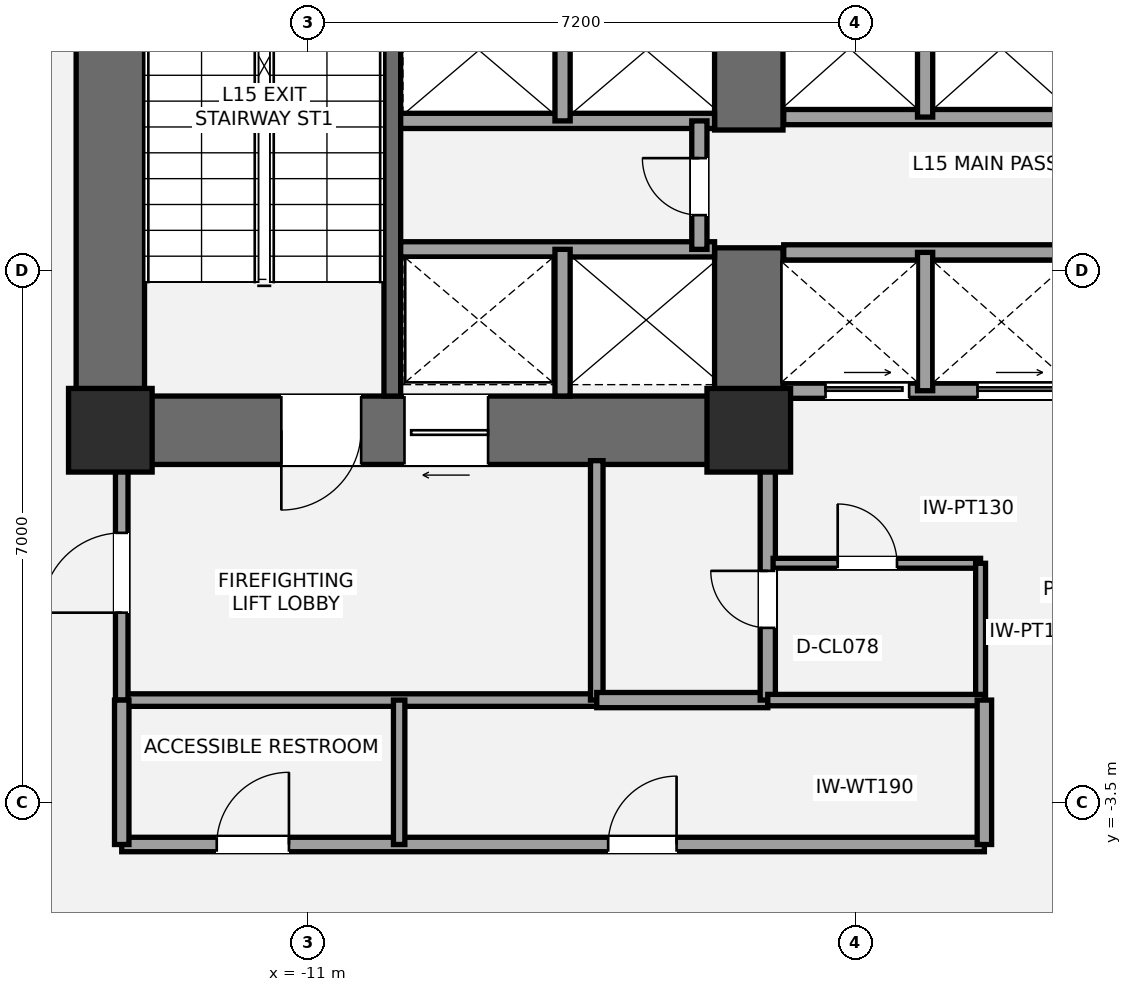
"""IFC4 building model, lengths in metres.
Left out: names, types, materials, properties, quantities, classifications, styles, units other than length and angle.
Written with IfcOpenShell. Run it as: python <this file> out.ifc"""

import sys

from ifc_helpers import new_model, si_unit, direction, frame, frame_2d, origin, origin_2d, place, context, subcontext, project, spatial, rectangle, extrude, element, fill, save


model = new_model("IFC4")
c1 = context("Model", 3, precision=1e-05, world=origin(), true_north=direction((0.0, 1.0)))
c2 = subcontext(c1, "Body", "Model", "MODEL_VIEW")
j1 = project(units=[si_unit("LENGTHUNIT", "METRE"), si_unit("PLANEANGLEUNIT", "RADIAN")], contexts=[c1])
p1 = place(None, origin())
s1 = spatial("IfcSite", under=j1, at=p1, CompositionType="ELEMENT")
p2 = place(p1, origin())
s2 = spatial("IfcBuilding", under=s1, at=p2, CompositionType="ELEMENT")
p3 = place(p2, frame((0.0, 0.0, 59.4)))
s3 = spatial("IfcBuildingStorey", under=s2, at=p3, CompositionType="ELEMENT", Elevation=59.4)
p4 = place(p3, frame((-13.6, 0.95, 0.0), z_axis=(0.0, 0.0, 1.0), x_axis=(0.0, 1.0, 0.0)))
e1 = element("IfcWall", 1, at=p4, inside=s3, PredefinedType="SHEAR", context=c2, shape_type="SweptSolid", body=[
    extrude(rectangle(XDim=8.95, YDim=0.9, at=frame_2d((4.475, 0.0))), origin(), (0.0, 0.0, 1.0), 3.6),
])
p5 = place(p3, frame((-4.75, 1.4, 0.0), z_axis=(0.0, 0.0, 1.0), x_axis=(-1.0, 0.0, 0.0)))
e2 = element("IfcWall", 2, at=p5, inside=s3, PredefinedType="SHEAR", context=c2, shape_type="SweptSolid", body=[
    extrude(rectangle(XDim=9.3, YDim=0.9, at=frame_2d((4.65, 0.0))), origin(), (0.0, 0.0, 1.0), 3.6),
])
p6 = place(p5, frame((5.55, 0.0, 0.0)))
e3 = element("IfcOpeningElement", 3, at=p6, cuts=e2, PredefinedType="OPENING", context=c2, shape_type="SweptSolid", body=[
    extrude(rectangle(XDim=1.05, YDim=2.15, at=frame_2d((0.525, 1.075))), frame((0.0, 0.46, 0.0), z_axis=(0.0, -1.0, 0.0), x_axis=(1.0, 0.0, 0.0)), (0.0, 0.0, 1.0), 0.92),
])
p7 = place(p5, frame((3.88, 0.0, 0.0)))
e4 = element("IfcOpeningElement", 4, at=p7, cuts=e2, PredefinedType="OPENING", context=c2, shape_type="SweptSolid", body=[
    extrude(rectangle(XDim=1.1, YDim=2.2, at=frame_2d((0.55, 1.1))), frame((0.0, 0.46, 0.0), z_axis=(0.0, -1.0, 0.0), x_axis=(1.0, 0.0, 0.0)), (0.0, 0.0, 1.0), 0.92),
])
p8 = place(p3, frame((-5.2, 0.95, 0.0), z_axis=(0.0, 0.0, 1.0), x_axis=(0.0, 1.0, 0.0)))
e5 = element("IfcWall", 5, at=p8, inside=s3, PredefinedType="SHEAR", context=c2, shape_type="SweptSolid", body=[
    extrude(rectangle(XDim=2.85, YDim=0.9, at=frame_2d((1.425, 0.0))), origin(), (0.0, 0.0, 1.0), 3.6),
])
p9 = place(p3, frame((-5.2, 5.35, 0.0), z_axis=(0.0, 0.0, 1.0), x_axis=(0.0, 1.0, 0.0)))
e6 = element("IfcWall", 6, at=p9, inside=s3, PredefinedType="SHEAR", context=c2, shape_type="SweptSolid", body=[
    extrude(rectangle(XDim=2.0, YDim=0.9, at=frame_2d((1.0, 0.0))), origin(), (0.0, 0.0, 1.0), 3.6),
])
p10 = place(p3, frame((-9.89, 1.85, 0.0), z_axis=(0.0, 0.0, 1.0), x_axis=(0.0, 1.0, 0.0)))
e7 = element("IfcWall", 7, at=p10, inside=s3, PredefinedType="SHEAR", context=c2, shape_type="SweptSolid", body=[
    extrude(rectangle(XDim=7.15, YDim=0.22, at=frame_2d((3.575, 0.0))), origin(), (0.0, 0.0, 1.0), 3.6),
])
for number, where, z_axis, x_axis in (
    (8, (-13.6, 1.4, 0.0), (0.0, 0.0, 1.0), (1.0, 0.0, 0.0)),
    (9, (-5.2, 1.4, 0.0), (0.0, 0.0, 1.0), (1.0, 0.0, 0.0)),
):
    element("IfcColumn", number, at=place(p3, frame(where, z_axis=z_axis, x_axis=x_axis)), inside=s3, PredefinedType="COLUMN", context=c2, shape_type="SweptSolid", body=[
        extrude(rectangle(XDim=1.1, YDim=1.1, at=origin_2d()), origin(), (0.0, 0.0, 1.0), 3.6),
    ])
p11 = place(p3, frame((-13.45, -2.15, 0.0), z_axis=(0.0, 0.0, 1.0), x_axis=(1.0, 0.0, 0.0)))
e10 = element("IfcWall", 10, at=p11, inside=s3, PredefinedType="PARTITIONING", context=c2, shape_type="SweptSolid", body=[
    extrude(rectangle(XDim=6.25, YDim=0.165, at=frame_2d((3.125, 0.0))), origin(), (0.0, 0.0, 1.0), 2.853),
])
p12 = place(p3, frame((-13.45, -2.15, 0.0), z_axis=(0.0, 0.0, 1.0), x_axis=(0.0, 1.0, 0.0)))
e11 = element("IfcWall", 11, at=p12, inside=s3, PredefinedType="PARTITIONING", context=c2, shape_type="SweptSolid", body=[
    extrude(rectangle(XDim=3.15, YDim=0.165, at=frame_2d((1.575, 0.0))), origin(), (0.0, 0.0, 1.0), 2.853),
])
p13 = place(p12, frame((1.15, 0.0, 0.0)))
e12 = element("IfcOpeningElement", 12, at=p13, cuts=e11, PredefinedType="OPENING", context=c2, shape_type="SweptSolid", body=[
    extrude(rectangle(XDim=1.05, YDim=2.15, at=frame_2d((0.525, 1.075))), frame((0.0, 0.093, 0.0), z_axis=(0.0, -1.0, 0.0), x_axis=(1.0, 0.0, 0.0)), (0.0, 0.0, 1.0), 0.185),
])
p14 = place(p3, frame((-7.2, -2.15, 0.0), z_axis=(0.0, 0.0, 1.0), x_axis=(0.0, 1.0, 0.0)))
e13 = element("IfcWall", 13, at=p14, inside=s3, PredefinedType="PARTITIONING", context=c2, shape_type="SweptSolid", body=[
    extrude(rectangle(XDim=3.15, YDim=0.165, at=frame_2d((1.575, 0.0))), origin(), (0.0, 0.0, 1.0), 2.853),
])
p15 = place(p3, frame((-7.2, -2.15, 0.0), z_axis=(0.0, 0.0, 1.0), x_axis=(1.0, 0.0, 0.0)))
e14 = element("IfcWall", 14, at=p15, inside=s3, PredefinedType="SOLIDWALL", context=c2, shape_type="SweptSolid", body=[
    extrude(rectangle(XDim=2.25, YDim=0.2, at=frame_2d((1.125, 0.0))), origin(), (0.0, 0.0, 1.0), 3.4),
])
p16 = place(p3, frame((-4.95, -2.15, 0.0), z_axis=(0.0, 0.0, 1.0), x_axis=(0.0, 1.0, 0.0)))
e15 = element("IfcWall", 15, at=p16, inside=s3, PredefinedType="SOLIDWALL", context=c2, shape_type="SweptSolid", body=[
    extrude(rectangle(XDim=3.15, YDim=0.2, at=frame_2d((1.575, 0.0))), origin(), (0.0, 0.0, 1.0), 2.853),
])
p17 = place(p16, frame((0.95, 0.0, 0.0)))
e16 = element("IfcOpeningElement", 16, at=p17, cuts=e15, PredefinedType="OPENING", context=c2, shape_type="SweptSolid", body=[
    extrude(rectangle(XDim=0.75, YDim=2.1, at=frame_2d((0.375, 1.05))), frame((0.0, 0.11, 0.0), z_axis=(0.0, -1.0, 0.0), x_axis=(1.0, 0.0, 0.0)), (0.0, 0.0, 1.0), 0.22),
])
p18 = place(p3, frame((-4.88, -0.35, 0.0), z_axis=(0.0, 0.0, 1.0), x_axis=(1.0, 0.0, 0.0)))
e17 = element("IfcWall", 17, at=p18, inside=s3, PredefinedType="PARTITIONING", context=c2, shape_type="SweptSolid", body=[
    extrude(rectangle(XDim=2.73, YDim=0.13, at=frame_2d((1.365, 0.0))), origin(), (0.0, 0.0, 1.0), 3.4),
])
p19 = place(p18, frame((0.85, 0.0, 0.0)))
e18 = element("IfcOpeningElement", 18, at=p19, cuts=e17, PredefinedType="OPENING", context=c2, shape_type="SweptSolid", body=[
    extrude(rectangle(XDim=0.78, YDim=2.1, at=frame_2d((0.39, 1.05))), frame((0.0, 0.075, 0.0), z_axis=(0.0, -1.0, 0.0), x_axis=(1.0, 0.0, 0.0)), (0.0, 0.0, 1.0), 0.15),
])
p20 = place(p3, frame((-2.15, -2.15, 0.0), z_axis=(0.0, 0.0, 1.0), x_axis=(0.0, 1.0, 0.0)))
e19 = element("IfcWall", 19, at=p20, inside=s3, PredefinedType="PARTITIONING", context=c2, shape_type="SweptSolid", body=[
    extrude(rectangle(XDim=1.8, YDim=0.13, at=frame_2d((0.9, 0.0))), origin(), (0.0, 0.0, 1.0), 3.4),
])
p21 = place(p3, frame((-9.78, 3.78, 0.0), z_axis=(0.0, 0.0, 1.0), x_axis=(1.0, 0.0, 0.0)))
e20 = element("IfcWall", 20, at=p21, inside=s3, PredefinedType="SOLIDWALL", context=c2, shape_type="SweptSolid", body=[
    extrude(rectangle(XDim=4.13, YDim=0.2, at=frame_2d((2.065, 0.0))), origin(), (0.0, 0.0, 1.0), 3.4),
])
p22 = place(p3, frame((-7.65, 1.85, 0.0), z_axis=(0.0, 0.0, 1.0), x_axis=(0.0, 1.0, 0.0)))
e21 = element("IfcWall", 21, at=p22, inside=s3, PredefinedType="SOLIDWALL", context=c2, shape_type="SweptSolid", body=[
    extrude(rectangle(XDim=1.93, YDim=0.2, at=frame_2d((0.965, 0.0))), origin(), (0.0, 0.0, 1.0), 3.4),
])
p23 = place(p3, frame((-9.78, 5.47, 0.0), z_axis=(0.0, 0.0, 1.0), x_axis=(1.0, 0.0, 0.0)))
e22 = element("IfcWall", 22, at=p23, inside=s3, PredefinedType="SOLIDWALL", context=c2, shape_type="SweptSolid", body=[
    extrude(rectangle(XDim=4.13, YDim=0.2, at=frame_2d((2.065, 0.0))), origin(), (0.0, 0.0, 1.0), 3.4),
])
p24 = place(p3, frame((-7.65, 5.47, 0.0), z_axis=(0.0, 0.0, 1.0), x_axis=(0.0, 1.0, 0.0)))
e23 = element("IfcWall", 23, at=p24, inside=s3, PredefinedType="SOLIDWALL", context=c2, shape_type="SweptSolid", body=[
    extrude(rectangle(XDim=1.86, YDim=0.2, at=frame_2d((0.93, 0.0))), origin(), (0.0, 0.0, 1.0), 3.4),
])
p25 = place(p3, frame((-5.85, 3.78, 0.0), z_axis=(0.0, 0.0, 1.0), x_axis=(0.0, 1.0, 0.0)))
e24 = element("IfcWall", 24, at=p25, inside=s3, PredefinedType="SOLIDWALL", context=c2, shape_type="SweptSolid", body=[
    extrude(rectangle(XDim=1.69, YDim=0.2, at=frame_2d((0.845, 0.0))), origin(), (0.0, 0.0, 1.0), 3.4),
])
p26 = place(p25, frame((0.45, 0.0, 0.0)))
e25 = element("IfcOpeningElement", 25, at=p26, cuts=e24, PredefinedType="OPENING", context=c2, shape_type="SweptSolid", body=[
    extrude(rectangle(XDim=0.75, YDim=2.1, at=frame_2d((0.375, 1.05))), frame((0.0, 0.11, 0.0), z_axis=(0.0, -1.0, 0.0), x_axis=(1.0, 0.0, 0.0)), (0.0, 0.0, 1.0), 0.22),
])
p27 = place(p3, frame((-4.74, 1.92, 0.0), z_axis=(0.0, 0.0, 1.0), x_axis=(1.0, 0.0, 0.0)))
e26 = element("IfcWall", 26, at=p27, inside=s3, PredefinedType="SOLIDWALL", context=c2, shape_type="SweptSolid", body=[
    extrude(rectangle(XDim=3.86, YDim=0.2, at=frame_2d((1.93, 0.0))), origin(), (0.0, 0.0, 1.0), 2.39),
])
p28 = place(p27, frame((0.55, 0.0, 0.0)))
e27 = element("IfcOpeningElement", 27, at=p28, cuts=e26, PredefinedType="OPENING", context=c2, shape_type="SweptSolid", body=[
    extrude(rectangle(XDim=1.1, YDim=2.2, at=frame_2d((0.55, 1.1))), frame((0.0, 0.11, 0.0), z_axis=(0.0, -1.0, 0.0), x_axis=(1.0, 0.0, 0.0)), (0.0, 0.0, 1.0), 0.22),
])
p29 = place(p27, frame((2.55, 0.0, 0.0)))
e28 = element("IfcOpeningElement", 28, at=p29, cuts=e26, PredefinedType="OPENING", context=c2, shape_type="SweptSolid", body=[
    extrude(rectangle(XDim=1.1, YDim=2.2, at=frame_2d((0.55, 1.1))), frame((0.0, 0.11, 0.0), z_axis=(0.0, -1.0, 0.0), x_axis=(1.0, 0.0, 0.0)), (0.0, 0.0, 1.0), 0.22),
])
p30 = place(p3, frame((-4.74, 3.74, 0.0), z_axis=(0.0, 0.0, 1.0), x_axis=(1.0, 0.0, 0.0)))
e29 = element("IfcWall", 29, at=p30, inside=s3, PredefinedType="SOLIDWALL", context=c2, shape_type="SweptSolid", body=[
    extrude(rectangle(XDim=3.86, YDim=0.2, at=frame_2d((1.93, 0.0))), origin(), (0.0, 0.0, 1.0), 3.4),
])
p31 = place(p3, frame((-2.88, 1.92, 0.0), z_axis=(0.0, 0.0, 1.0), x_axis=(0.0, 1.0, 0.0)))
e30 = element("IfcWall", 30, at=p31, inside=s3, PredefinedType="SOLIDWALL", context=c2, shape_type="SweptSolid", body=[
    extrude(rectangle(XDim=1.82, YDim=0.2, at=frame_2d((0.91, 0.0))), origin(), (0.0, 0.0, 1.0), 3.4),
])
p32 = place(p3, frame((-4.74, 5.52, 0.0), z_axis=(0.0, 0.0, 1.0), x_axis=(1.0, 0.0, 0.0)))
e31 = element("IfcWall", 31, at=p32, inside=s3, PredefinedType="SOLIDWALL", context=c2, shape_type="SweptSolid", body=[
    extrude(rectangle(XDim=3.86, YDim=0.2, at=frame_2d((1.93, 0.0))), origin(), (0.0, 0.0, 1.0), 3.4),
])
p33 = place(p3, frame((-2.88, 5.52, 0.0), z_axis=(0.0, 0.0, 1.0), x_axis=(0.0, 1.0, 0.0)))
e32 = element("IfcWall", 32, at=p33, inside=s3, PredefinedType="SOLIDWALL", context=c2, shape_type="SweptSolid", body=[
    extrude(rectangle(XDim=1.81, YDim=0.2, at=frame_2d((0.905, 0.0))), origin(), (0.0, 0.0, 1.0), 3.4),
])
p34 = place(p3, frame((-13.45, -4.05, 0.0), z_axis=(0.0, 0.0, 1.0), x_axis=(1.0, 0.0, 0.0)))
e33 = element("IfcWall", 33, at=p34, inside=s3, PredefinedType="PLUMBINGWALL", context=c2, shape_type="SweptSolid", body=[
    extrude(rectangle(XDim=11.35, YDim=0.19, at=frame_2d((5.675, 0.0))), origin(), (0.0, 0.0, 1.0), 2.933),
])
p35 = place(p34, frame((1.25, 0.0, 0.0)))
e34 = element("IfcOpeningElement", 34, at=p35, cuts=e33, PredefinedType="OPENING", context=c2, shape_type="SweptSolid", body=[
    extrude(rectangle(XDim=0.95, YDim=2.15, at=frame_2d((0.475, 1.075))), frame((0.0, 0.105, 0.0), z_axis=(0.0, -1.0, 0.0), x_axis=(1.0, 0.0, 0.0)), (0.0, 0.0, 1.0), 0.21),
])
p36 = place(p34, frame((6.4, 0.0, 0.0)))
e35 = element("IfcOpeningElement", 35, at=p36, cuts=e33, PredefinedType="OPENING", context=c2, shape_type="SweptSolid", body=[
    extrude(rectangle(XDim=0.9, YDim=2.1, at=frame_2d((0.45, 1.05))), frame((0.0, 0.105, 0.0), z_axis=(0.0, -1.0, 0.0), x_axis=(1.0, 0.0, 0.0)), (0.0, 0.0, 1.0), 0.21),
])
p37 = place(p3, frame((-4.95, -2.15, 0.0), z_axis=(0.0, 0.0, 1.0), x_axis=(1.0, 0.0, 0.0)))
e36 = element("IfcWall", 36, at=p37, inside=s3, PredefinedType="PLUMBINGWALL", context=c2, shape_type="SweptSolid", body=[
    extrude(rectangle(XDim=2.85, YDim=0.15, at=frame_2d((1.425, 0.0))), origin(), (0.0, 0.0, 1.0), 3.4),
])
p38 = place(p3, frame((-13.45, -4.05, 0.0), z_axis=(0.0, 0.0, 1.0), x_axis=(0.0, 1.0, 0.0)))
e37 = element("IfcWall", 37, at=p38, inside=s3, PredefinedType="PLUMBINGWALL", context=c2, shape_type="SweptSolid", body=[
    extrude(rectangle(XDim=1.9, YDim=0.19, at=frame_2d((0.95, 0.0))), origin(), (0.0, 0.0, 1.0), 2.853),
])
p39 = place(p3, frame((-2.1, -4.05, 0.0), z_axis=(0.0, 0.0, 1.0), x_axis=(0.0, 1.0, 0.0)))
e38 = element("IfcWall", 38, at=p39, inside=s3, PredefinedType="PLUMBINGWALL", context=c2, shape_type="SweptSolid", body=[
    extrude(rectangle(XDim=1.9, YDim=0.19, at=frame_2d((0.95, 0.0))), origin(), (0.0, 0.0, 1.0), 3.4),
])
p40 = place(p3, frame((-9.8, -4.05, 0.0), z_axis=(0.0, 0.0, 1.0), x_axis=(0.0, 1.0, 0.0)))
e39 = element("IfcWall", 39, at=p40, inside=s3, PredefinedType="PLUMBINGWALL", context=c2, shape_type="SweptSolid", body=[
    extrude(rectangle(XDim=1.9, YDim=0.15, at=frame_2d((0.95, 0.0))), origin(), (0.0, 0.0, 1.0), 3.4),
])
p41 = place(p6, origin())
e40 = element("IfcDoor", 40, at=p41, inside=s3, OperationType="SINGLE_SWING_RIGHT", PredefinedType="DOOR", context=c2, shape_type="SweptSolid", body=[
    extrude(rectangle(XDim=1.05, YDim=2.15, at=frame_2d((0.525, 1.075))), frame((0.0, 0.025, 0.0), z_axis=(0.0, -1.0, 0.0), x_axis=(1.0, 0.0, 0.0)), (0.0, 0.0, 1.0), 0.05),
])
fill(e3, e40)
p42 = place(p13, origin())
e41 = element("IfcDoor", 41, at=p42, inside=s3, OperationType="SINGLE_SWING_LEFT", PredefinedType="DOOR", context=c2, shape_type="SweptSolid", body=[
    extrude(rectangle(XDim=1.05, YDim=2.15, at=frame_2d((0.525, 1.075))), frame((0.0, 0.025, 0.0), z_axis=(0.0, -1.0, 0.0), x_axis=(1.0, 0.0, 0.0)), (0.0, 0.0, 1.0), 0.05),
])
fill(e12, e41)
p43 = place(p17, origin())
e42 = element("IfcDoor", 42, at=p43, inside=s3, OperationType="SINGLE_SWING_RIGHT", PredefinedType="DOOR", context=c2, shape_type="SweptSolid", body=[
    extrude(rectangle(XDim=0.75, YDim=2.1, at=frame_2d((0.375, 1.05))), frame((0.0, 0.025, 0.0), z_axis=(0.0, -1.0, 0.0), x_axis=(1.0, 0.0, 0.0)), (0.0, 0.0, 1.0), 0.05),
])
fill(e16, e42)
p44 = place(p19, origin())
e43 = element("IfcDoor", 43, at=p44, inside=s3, OperationType="SINGLE_SWING_LEFT", PredefinedType="DOOR", context=c2, shape_type="SweptSolid", body=[
    extrude(rectangle(XDim=0.78, YDim=2.1, at=frame_2d((0.39, 1.05))), frame((0.0, 0.025, 0.0), z_axis=(0.0, -1.0, 0.0), x_axis=(1.0, 0.0, 0.0)), (0.0, 0.0, 1.0), 0.05),
])
fill(e18, e43)
p45 = place(p7, origin())
e44 = element("IfcDoor", 44, at=p45, inside=s3, OperationType="SLIDING_TO_LEFT", PredefinedType="DOOR", context=c2, shape_type="SweptSolid", body=[
    extrude(rectangle(XDim=1.1, YDim=2.2, at=frame_2d((0.55, 1.1))), frame((0.0, 0.025, 0.0), z_axis=(0.0, -1.0, 0.0), x_axis=(1.0, 0.0, 0.0)), (0.0, 0.0, 1.0), 0.05),
])
fill(e4, e44)
p46 = place(p26, origin())
e45 = element("IfcDoor", 45, at=p46, inside=s3, OperationType="SINGLE_SWING_RIGHT", PredefinedType="DOOR", context=c2, shape_type="SweptSolid", body=[
    extrude(rectangle(XDim=0.75, YDim=2.1, at=frame_2d((0.375, 1.05))), frame((0.0, 0.025, 0.0), z_axis=(0.0, -1.0, 0.0), x_axis=(1.0, 0.0, 0.0)), (0.0, 0.0, 1.0), 0.05),
])
fill(e25, e45)
p47 = place(p28, origin())
e46 = element("IfcDoor", 46, at=p47, inside=s3, OperationType="SLIDING_TO_LEFT", PredefinedType="DOOR", context=c2, shape_type="SweptSolid", body=[
    extrude(rectangle(XDim=1.1, YDim=2.2, at=frame_2d((0.55, 1.1))), frame((0.0, 0.025, 0.0), z_axis=(0.0, -1.0, 0.0), x_axis=(1.0, 0.0, 0.0)), (0.0, 0.0, 1.0), 0.05),
])
fill(e27, e46)
p48 = place(p29, origin())
e47 = element("IfcDoor", 47, at=p48, inside=s3, OperationType="SLIDING_TO_LEFT", PredefinedType="DOOR", context=c2, shape_type="SweptSolid", body=[
    extrude(rectangle(XDim=1.1, YDim=2.2, at=frame_2d((0.55, 1.1))), frame((0.0, 0.025, 0.0), z_axis=(0.0, -1.0, 0.0), x_axis=(1.0, 0.0, 0.0)), (0.0, 0.0, 1.0), 0.05),
])
fill(e28, e47)
p49 = place(p35, origin())
e48 = element("IfcDoor", 48, at=p49, inside=s3, OperationType="SINGLE_SWING_RIGHT", PredefinedType="DOOR", context=c2, shape_type="SweptSolid", body=[
    extrude(rectangle(XDim=0.95, YDim=2.15, at=frame_2d((0.475, 1.075))), frame((0.0, 0.025, 0.0), z_axis=(0.0, -1.0, 0.0), x_axis=(1.0, 0.0, 0.0)), (0.0, 0.0, 1.0), 0.05),
])
fill(e34, e48)
p50 = place(p36, origin())
e49 = element("IfcDoor", 49, at=p50, inside=s3, OperationType="SINGLE_SWING_RIGHT", PredefinedType="DOOR", context=c2, shape_type="SweptSolid", body=[
    extrude(rectangle(XDim=0.9, YDim=2.1, at=frame_2d((0.45, 1.05))), frame((0.0, 0.025, 0.0), z_axis=(0.0, -1.0, 0.0), x_axis=(1.0, 0.0, 0.0)), (0.0, 0.0, 1.0), 0.05),
])
fill(e35, e49)
save(model, sys.argv[1])
